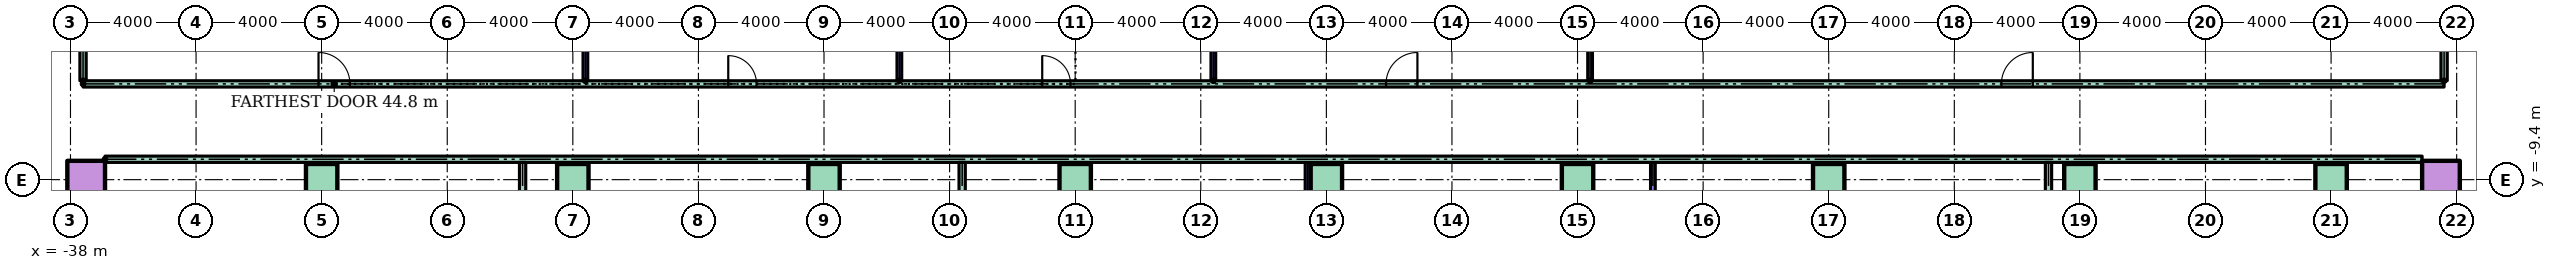
"""IFC4 building model, lengths in metres.
Left out: names, types, materials, properties, quantities, classifications, styles, units other than length and angle.
Written with IfcOpenShell. Run it as: python <this file> out.ifc"""

import sys

from ifc_helpers import new_model, si_unit, direction, frame, frame_2d, origin, origin_2d, place, context, subcontext, project, spatial, rectangle, hollow_rectangle, extrude, element, fill, save


model = new_model("IFC4")
c1 = context("Model", 3, precision=1e-05, world=origin(), true_north=direction((0.0, 1.0)))
c2 = subcontext(c1, "Body", "Model", "MODEL_VIEW")
j1 = project(units=[si_unit("LENGTHUNIT", "METRE"), si_unit("PLANEANGLEUNIT", "RADIAN")], contexts=[c1])
p1 = place(None, origin())
s1 = spatial("IfcSite", under=j1, at=p1, CompositionType="ELEMENT")
p2 = place(p1, origin())
s2 = spatial("IfcBuilding", under=s1, at=p2, CompositionType="ELEMENT")
p3 = place(p2, frame((0.0, 0.0, 18.0)))
s3 = spatial("IfcBuildingStorey", under=s2, at=p3, CompositionType="ELEMENT", Elevation=18.0)
p4 = place(p3, frame((-37.5, -9.4, 0.0)))
e1 = element("IfcColumn", 1, at=p4, inside=s3, PredefinedType="COLUMN", context=c2, shape_type="SweptSolid", body=[
    extrude(hollow_rectangle(XDim=1.2, YDim=1.2, WallThickness=0.06, at=origin_2d()), origin(), (0.0, 0.0, 1.0), 4.0),
])
for number, where in (
    (2, (-30.0, -9.4, 0.0)),
    (3, (-22.0, -9.4, 0.0)),
    (4, (-14.0, -9.4, 0.0)),
    (5, (-6.0, -9.4, 0.0)),
    (6, (2.0, -9.4, 0.0)),
    (7, (10.0, -9.4, 0.0)),
    (8, (18.0, -9.4, 0.0)),
    (9, (26.0, -9.4, 0.0)),
    (10, (34.0, -9.4, 0.0)),
):
    element("IfcColumn", number, at=place(p3, frame(where)), inside=s3, PredefinedType="COLUMN", context=c2, shape_type="SweptSolid", body=[
        extrude(rectangle(XDim=1.0, YDim=1.0, at=origin_2d()), origin(), (0.0, 0.0, 1.0), 4.0),
    ])
p5 = place(p3, frame((37.5, -9.4, 0.0)))
e11 = element("IfcColumn", 11, at=p5, inside=s3, PredefinedType="COLUMN", context=c2, shape_type="SweptSolid", body=[
    extrude(hollow_rectangle(XDim=1.2, YDim=1.2, WallThickness=0.06, at=origin_2d()), origin(), (0.0, 0.0, 1.0), 4.0),
])
p6 = place(p3, frame((-36.9, -8.75, 0.0)))
e12 = element("IfcWall", 12, at=p6, inside=s3, PredefinedType="PARTITIONING", context=c2, shape_type="SweptSolid", body=[
    extrude(rectangle(XDim=73.8, YDim=0.2, at=frame_2d((36.9, 0.0))), origin(), (0.0, 0.0, 1.0), 3.7),
])
p7 = place(p3, frame((-37.6, -6.35, 0.0)))
e13 = element("IfcWall", 13, at=p7, inside=s3, PredefinedType="PARTITIONING", context=c2, shape_type="SweptSolid", body=[
    extrude(rectangle(XDim=75.2, YDim=0.2, at=frame_2d((37.6, 0.0))), origin(), (0.0, 0.0, 1.0), 3.7),
])
p8 = place(p7, frame((7.5, 0.0, 0.0)))
e14 = element("IfcOpeningElement", 14, at=p8, cuts=e13, PredefinedType="OPENING", context=c2, shape_type="SweptSolid", body=[
    extrude(rectangle(XDim=1.0, YDim=2.1, at=frame_2d((0.5, 1.05))), frame((0.0, 0.11, 0.0), z_axis=(0.0, -1.0, 0.0), x_axis=(1.0, 0.0, 0.0)), (0.0, 0.0, 1.0), 0.22),
])
p9 = place(p7, frame((20.55, 0.0, 0.0)))
e15 = element("IfcOpeningElement", 15, at=p9, cuts=e13, PredefinedType="OPENING", context=c2, shape_type="SweptSolid", body=[
    extrude(rectangle(XDim=0.9, YDim=2.1, at=frame_2d((0.45, 1.05))), frame((0.0, 0.11, 0.0), z_axis=(0.0, -1.0, 0.0), x_axis=(1.0, 0.0, 0.0)), (0.0, 0.0, 1.0), 0.22),
])
p10 = place(p7, frame((30.55, 0.0, 0.0)))
e16 = element("IfcOpeningElement", 16, at=p10, cuts=e13, PredefinedType="OPENING", context=c2, shape_type="SweptSolid", body=[
    extrude(rectangle(XDim=0.9, YDim=2.1, at=frame_2d((0.45, 1.05))), frame((0.0, 0.11, 0.0), z_axis=(0.0, -1.0, 0.0), x_axis=(1.0, 0.0, 0.0)), (0.0, 0.0, 1.0), 0.22),
])
p11 = place(p7, frame((41.5, 0.0, 0.0)))
e17 = element("IfcOpeningElement", 17, at=p11, cuts=e13, PredefinedType="OPENING", context=c2, shape_type="SweptSolid", body=[
    extrude(rectangle(XDim=1.0, YDim=2.1, at=frame_2d((0.5, 1.05))), frame((0.0, 0.11, 0.0), z_axis=(0.0, -1.0, 0.0), x_axis=(1.0, 0.0, 0.0)), (0.0, 0.0, 1.0), 0.22),
])
p12 = place(p7, frame((61.1, 0.0, 0.0)))
e18 = element("IfcOpeningElement", 18, at=p12, cuts=e13, PredefinedType="OPENING", context=c2, shape_type="SweptSolid", body=[
    extrude(rectangle(XDim=1.0, YDim=2.1, at=frame_2d((0.5, 1.05))), frame((0.0, 0.11, 0.0), z_axis=(0.0, -1.0, 0.0), x_axis=(1.0, 0.0, 0.0)), (0.0, 0.0, 1.0), 0.22),
])
p13 = place(p3, frame((-37.6, -6.25, 0.0), z_axis=(0.0, 0.0, 1.0), x_axis=(0.0, 1.0, 0.0)))
e19 = element("IfcWall", 19, at=p13, inside=s3, PredefinedType="PARTITIONING", context=c2, shape_type="SweptSolid", body=[
    extrude(rectangle(XDim=3.65, YDim=0.2, at=frame_2d((1.825, 0.0))), origin(), (0.0, 0.0, 1.0), 3.7),
])
p14 = place(p3, frame((-23.6, -19.5, 0.0), z_axis=(0.0, 0.0, 1.0), x_axis=(0.0, 1.0, 0.0)))
e20 = element("IfcWall", 20, at=p14, inside=s3, PredefinedType="PARTITIONING", context=c2, shape_type="SweptSolid", body=[
    extrude(rectangle(XDim=10.65, YDim=0.2, at=frame_2d((5.325, 0.0))), origin(), (0.0, 0.0, 1.0), 3.7),
])
p15 = place(p3, frame((-21.6, -6.25, 0.0), z_axis=(0.0, 0.0, 1.0), x_axis=(0.0, 1.0, 0.0)))
e21 = element("IfcWall", 21, at=p15, inside=s3, PredefinedType="PARTITIONING", context=c2, shape_type="SweptSolid", body=[
    extrude(rectangle(XDim=3.75, YDim=0.15, at=frame_2d((1.875, 0.0))), origin(), (0.0, 0.0, 1.0), 3.7),
])
p16 = place(p3, frame((-11.6, -6.25, 0.0), z_axis=(0.0, 0.0, 1.0), x_axis=(0.0, 1.0, 0.0)))
e22 = element("IfcWall", 22, at=p16, inside=s3, PredefinedType="PARTITIONING", context=c2, shape_type="SweptSolid", body=[
    extrude(rectangle(XDim=4.85, YDim=0.15, at=frame_2d((2.425, 0.0))), origin(), (0.0, 0.0, 1.0), 3.7),
])
p17 = place(p3, frame((-9.6, -19.5, 0.0), z_axis=(0.0, 0.0, 1.0), x_axis=(0.0, 1.0, 0.0)))
e23 = element("IfcWall", 23, at=p17, inside=s3, PredefinedType="PARTITIONING", context=c2, shape_type="SweptSolid", body=[
    extrude(rectangle(XDim=10.65, YDim=0.2, at=frame_2d((5.325, 0.0))), origin(), (0.0, 0.0, 1.0), 3.7),
])
p18 = place(p3, frame((-1.6, -6.25, 0.0), z_axis=(0.0, 0.0, 1.0), x_axis=(0.0, 1.0, 0.0)))
e24 = element("IfcWall", 24, at=p18, inside=s3, PredefinedType="PARTITIONING", context=c2, shape_type="SweptSolid", body=[
    extrude(rectangle(XDim=4.85, YDim=0.15, at=frame_2d((2.425, 0.0))), origin(), (0.0, 0.0, 1.0), 3.7),
])
p19 = place(p3, frame((1.4, -16.5, 0.0), z_axis=(0.0, 0.0, 1.0), x_axis=(0.0, 1.0, 0.0)))
e25 = element("IfcWall", 25, at=p19, inside=s3, PredefinedType="PARTITIONING", context=c2, shape_type="SweptSolid", body=[
    extrude(rectangle(XDim=7.65, YDim=0.15, at=frame_2d((3.825, 0.0))), origin(), (0.0, 0.0, 1.0), 3.7),
])
p20 = place(p3, frame((10.4, -6.25, 0.0), z_axis=(0.0, 0.0, 1.0), x_axis=(0.0, 1.0, 0.0)))
e26 = element("IfcWall", 26, at=p20, inside=s3, PredefinedType="PARTITIONING", context=c2, shape_type="SweptSolid", body=[
    extrude(rectangle(XDim=3.75, YDim=0.15, at=frame_2d((1.875, 0.0))), origin(), (0.0, 0.0, 1.0), 3.7),
])
p21 = place(p3, frame((12.4, -19.5, 0.0), z_axis=(0.0, 0.0, 1.0), x_axis=(0.0, 1.0, 0.0)))
e27 = element("IfcWall", 27, at=p21, inside=s3, PredefinedType="PARTITIONING", context=c2, shape_type="SweptSolid", body=[
    extrude(rectangle(XDim=10.65, YDim=0.15, at=frame_2d((5.325, 0.0))), origin(), (0.0, 0.0, 1.0), 3.7),
])
p22 = place(p3, frame((25.0, -19.5, 0.0), z_axis=(0.0, 0.0, 1.0), x_axis=(0.0, 1.0, 0.0)))
e28 = element("IfcWall", 28, at=p22, inside=s3, PredefinedType="PARTITIONING", context=c2, shape_type="SweptSolid", body=[
    extrude(rectangle(XDim=10.65, YDim=0.2, at=frame_2d((5.325, 0.0))), origin(), (0.0, 0.0, 1.0), 3.7),
])
p23 = place(p3, frame((37.6, -6.25, 0.0), z_axis=(0.0, 0.0, 1.0), x_axis=(0.0, 1.0, 0.0)))
e29 = element("IfcWall", 29, at=p23, inside=s3, PredefinedType="PARTITIONING", context=c2, shape_type="SweptSolid", body=[
    extrude(rectangle(XDim=3.65, YDim=0.2, at=frame_2d((1.825, 0.0))), origin(), (0.0, 0.0, 1.0), 3.7),
])
p24 = place(p8, origin())
e30 = element("IfcDoor", 30, at=p24, inside=s3, OperationType="SINGLE_SWING_LEFT", PredefinedType="DOOR", context=c2, shape_type="SweptSolid", body=[
    extrude(rectangle(XDim=1.0, YDim=2.1, at=frame_2d((0.5, 1.05))), frame((0.0, 0.025, 0.0), z_axis=(0.0, -1.0, 0.0), x_axis=(1.0, 0.0, 0.0)), (0.0, 0.0, 1.0), 0.05),
])
fill(e14, e30)
p25 = place(p9, origin())
e31 = element("IfcDoor", 31, at=p25, inside=s3, OperationType="SINGLE_SWING_LEFT", PredefinedType="DOOR", context=c2, shape_type="SweptSolid", body=[
    extrude(rectangle(XDim=0.9, YDim=2.1, at=frame_2d((0.45, 1.05))), frame((0.0, 0.025, 0.0), z_axis=(0.0, -1.0, 0.0), x_axis=(1.0, 0.0, 0.0)), (0.0, 0.0, 1.0), 0.05),
])
fill(e15, e31)
p26 = place(p10, origin())
e32 = element("IfcDoor", 32, at=p26, inside=s3, OperationType="SINGLE_SWING_LEFT", PredefinedType="DOOR", context=c2, shape_type="SweptSolid", body=[
    extrude(rectangle(XDim=0.9, YDim=2.1, at=frame_2d((0.45, 1.05))), frame((0.0, 0.025, 0.0), z_axis=(0.0, -1.0, 0.0), x_axis=(1.0, 0.0, 0.0)), (0.0, 0.0, 1.0), 0.05),
])
fill(e16, e32)
p27 = place(p11, origin())
e33 = element("IfcDoor", 33, at=p27, inside=s3, OperationType="SINGLE_SWING_RIGHT", PredefinedType="DOOR", context=c2, shape_type="SweptSolid", body=[
    extrude(rectangle(XDim=1.0, YDim=2.1, at=frame_2d((0.5, 1.05))), frame((0.0, 0.025, 0.0), z_axis=(0.0, -1.0, 0.0), x_axis=(1.0, 0.0, 0.0)), (0.0, 0.0, 1.0), 0.05),
])
fill(e17, e33)
p28 = place(p12, origin())
e34 = element("IfcDoor", 34, at=p28, inside=s3, OperationType="SINGLE_SWING_RIGHT", PredefinedType="DOOR", context=c2, shape_type="SweptSolid", body=[
    extrude(rectangle(XDim=1.0, YDim=2.1, at=frame_2d((0.5, 1.05))), frame((0.0, 0.025, 0.0), z_axis=(0.0, -1.0, 0.0), x_axis=(1.0, 0.0, 0.0)), (0.0, 0.0, 1.0), 0.05),
])
fill(e18, e34)
save(model, sys.argv[1])
